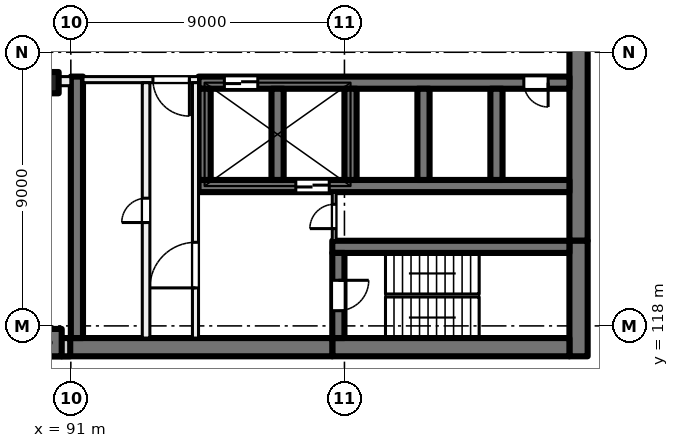
"""IFC4 building model, lengths in metres.
Left out: names, types, materials, properties, quantities, classifications, styles, units other than length and angle.
Written with IfcOpenShell. Run it as: python <this file> out.ifc"""

import sys

from ifc_helpers import new_model, si_unit, direction, frame, frame_2d, origin, origin_2d, place, context, subcontext, project, spatial, rectangle, extrude, element, fill, save


model = new_model("IFC4")
c1 = context("Model", 3, precision=1e-05, world=origin(), true_north=direction((0.0, 1.0)))
c2 = subcontext(c1, "Body", "Model", "MODEL_VIEW")
j1 = project(units=[si_unit("LENGTHUNIT", "METRE"), si_unit("PLANEANGLEUNIT", "RADIAN")], contexts=[c1])
p1 = place(None, origin())
s1 = spatial("IfcSite", under=j1, at=p1, CompositionType="ELEMENT")
p2 = place(p1, origin())
s2 = spatial("IfcBuilding", under=s1, at=p2, CompositionType="ELEMENT")
p3 = place(p2, frame((0.0, 0.0, 59.5)))
s3 = spatial("IfcBuildingStorey", under=s2, at=p3, CompositionType="ELEMENT", Elevation=59.5)
p4 = place(p3, frame((90.25, 126.0, 0.0), z_axis=(0.0, 0.0, 1.0), x_axis=(1.0, 0.0, 0.0)))
e1 = element("IfcColumn", 1, at=p4, inside=s3, PredefinedType="COLUMN", context=c2, shape_type="SweptSolid", body=[
    extrude(rectangle(XDim=0.7, YDim=0.7, at=origin_2d()), origin(), (0.0, 0.0, 1.0), 4.0),
])
p5 = place(p3, frame((90.25, 117.45, 0.0), z_axis=(0.0, 0.0, 1.0), x_axis=(1.0, 0.0, 0.0)))
e2 = element("IfcColumn", 2, at=p5, inside=s3, PredefinedType="COLUMN", context=c2, shape_type="SweptSolid", body=[
    extrude(rectangle(XDim=0.9, YDim=0.9, at=origin_2d()), origin(), (0.0, 0.0, 1.0), 4.0),
])
p6 = place(p3, frame((107.7, 135.2, 0.0), z_axis=(0.0, 0.0, 1.0), x_axis=(0.0, -1.0, 0.0)))
e3 = element("IfcWall", 3, at=p6, inside=s3, PredefinedType="SHEAR", context=c2, shape_type="SweptSolid", body=[
    extrude(rectangle(XDim=14.4, YDim=0.6, at=frame_2d((7.2, 0.0))), origin(), (0.0, 0.0, 1.0), 4.0),
])
p7 = place(p3, frame((107.7, 120.8, 0.0), z_axis=(0.0, 0.0, 1.0), x_axis=(0.0, -1.0, 0.0)))
e4 = element("IfcWall", 4, at=p7, inside=s3, PredefinedType="SHEAR", context=c2, shape_type="SweptSolid", body=[
    extrude(rectangle(XDim=3.8, YDim=0.6, at=frame_2d((1.9, 0.0))), origin(), (0.0, 0.0, 1.0), 4.0),
])
p8 = place(p3, frame((107.4, 117.3, 0.0), z_axis=(0.0, 0.0, 1.0), x_axis=(-1.0, 0.0, 0.0)))
e5 = element("IfcWall", 5, at=p8, inside=s3, PredefinedType="SHEAR", context=c2, shape_type="SweptSolid", body=[
    extrude(rectangle(XDim=7.8, YDim=0.6, at=frame_2d((3.9, 0.0))), origin(), (0.0, 0.0, 1.0), 4.0),
])
p9 = place(p3, frame((99.6, 117.3, 0.0), z_axis=(0.0, 0.0, 1.0), x_axis=(-1.0, 0.0, 0.0)))
e6 = element("IfcWall", 6, at=p9, inside=s3, PredefinedType="SHEAR", context=c2, shape_type="SweptSolid", body=[
    extrude(rectangle(XDim=8.9, YDim=0.6, at=frame_2d((4.45, 0.0))), origin(), (0.0, 0.0, 1.0), 4.0),
])
p10 = place(p3, frame((107.4, 120.6, 0.0), z_axis=(0.0, 0.0, 1.0), x_axis=(-1.0, 0.0, 0.0)))
e7 = element("IfcWall", 7, at=p10, inside=s3, PredefinedType="SHEAR", context=c2, shape_type="SweptSolid", body=[
    extrude(rectangle(XDim=7.8, YDim=0.4, at=frame_2d((3.9, 0.0))), origin(), (0.0, 0.0, 1.0), 4.0),
])
p11 = place(p3, frame((99.8, 120.4, 0.0), z_axis=(0.0, 0.0, 1.0), x_axis=(0.0, -1.0, 0.0)))
e8 = element("IfcWall", 8, at=p11, inside=s3, PredefinedType="SHEAR", context=c2, shape_type="SweptSolid", body=[
    extrude(rectangle(XDim=2.8, YDim=0.4, at=frame_2d((1.4, 0.0))), origin(), (0.0, 0.0, 1.0), 4.0),
])
p12 = place(p11, frame((0.9, 0.0, 0.0)))
e9 = element("IfcOpeningElement", 9, at=p12, cuts=e8, PredefinedType="OPENING", context=c2, shape_type="SweptSolid", body=[
    extrude(rectangle(XDim=1.0, YDim=2.1, at=frame_2d((0.5, 1.05))), frame((0.0, 0.21, 0.0), z_axis=(0.0, -1.0, 0.0), x_axis=(1.0, 0.0, 0.0)), (0.0, 0.0, 1.0), 0.42),
])
p13 = place(p3, frame((107.4, 126.0, 0.0), z_axis=(0.0, 0.0, 1.0), x_axis=(-1.0, 0.0, 0.0)))
e10 = element("IfcWall", 10, at=p13, inside=s3, PredefinedType="SHEAR", context=c2, shape_type="SweptSolid", body=[
    extrude(rectangle(XDim=12.2, YDim=0.4, at=frame_2d((6.1, 0.0))), origin(), (0.0, 0.0, 1.0), 4.0),
])
p14 = place(p13, frame((10.25, 0.0, 0.0)))
e11 = element("IfcOpeningElement", 11, at=p14, cuts=e10, PredefinedType="OPENING", context=c2, shape_type="SweptSolid", body=[
    extrude(rectangle(XDim=1.1, YDim=2.1, at=frame_2d((0.55, 1.05))), frame((0.0, 0.21, 0.0), z_axis=(0.0, -1.0, 0.0), x_axis=(1.0, 0.0, 0.0)), (0.0, 0.0, 1.0), 0.42),
])
p15 = place(p13, frame((0.7, 0.0, 0.0)))
e12 = element("IfcOpeningElement", 12, at=p15, cuts=e10, PredefinedType="OPENING", context=c2, shape_type="SweptSolid", body=[
    extrude(rectangle(XDim=0.8, YDim=2.1, at=frame_2d((0.4, 1.05))), frame((0.0, 0.21, 0.0), z_axis=(0.0, -1.0, 0.0), x_axis=(1.0, 0.0, 0.0)), (0.0, 0.0, 1.0), 0.42),
])
p16 = place(p3, frame((107.4, 122.6, 0.0), z_axis=(0.0, 0.0, 1.0), x_axis=(-1.0, 0.0, 0.0)))
e13 = element("IfcWall", 13, at=p16, inside=s3, PredefinedType="SHEAR", context=c2, shape_type="SweptSolid", body=[
    extrude(rectangle(XDim=12.2, YDim=0.4, at=frame_2d((6.1, 0.0))), origin(), (0.0, 0.0, 1.0), 4.0),
])
p17 = place(p16, frame((7.9, 0.0, 0.0)))
e14 = element("IfcOpeningElement", 14, at=p17, cuts=e13, PredefinedType="OPENING", context=c2, shape_type="SweptSolid", body=[
    extrude(rectangle(XDim=1.1, YDim=2.1, at=frame_2d((0.55, 1.05))), frame((0.0, 0.21, 0.0), z_axis=(0.0, -1.0, 0.0), x_axis=(1.0, 0.0, 0.0)), (0.0, 0.0, 1.0), 0.42),
])
for number, where, z_axis, x_axis in (
    (15, (105.0, 125.8, 0.0), (0.0, 0.0, 1.0), (0.0, -1.0, 0.0)),
    (16, (102.6, 125.8, 0.0), (0.0, 0.0, 1.0), (0.0, -1.0, 0.0)),
    (17, (100.2, 125.8, 0.0), (0.0, 0.0, 1.0), (0.0, -1.0, 0.0)),
    (18, (97.8, 125.8, 0.0), (0.0, 0.0, 1.0), (0.0, -1.0, 0.0)),
    (19, (95.4, 125.8, 0.0), (0.0, 0.0, 1.0), (0.0, -1.0, 0.0)),
):
    element("IfcWall", number, at=place(p3, frame(where, z_axis=z_axis, x_axis=x_axis)), inside=s3, PredefinedType="SHEAR", context=c2, shape_type="SweptSolid", body=[
        extrude(rectangle(XDim=3.0, YDim=0.4, at=frame_2d((1.5, 0.0))), origin(), (0.0, 0.0, 1.0), 4.0),
    ])
p18 = place(p3, frame((91.2, 126.2, 0.0), z_axis=(0.0, 0.0, 1.0), x_axis=(0.0, -1.0, 0.0)))
e20 = element("IfcWall", 20, at=p18, inside=s3, PredefinedType="SHEAR", context=c2, shape_type="SweptSolid", body=[
    extrude(rectangle(XDim=8.6, YDim=0.4, at=frame_2d((4.3, 0.0))), origin(), (0.0, 0.0, 1.0), 4.0),
])
p19 = place(p3, frame((90.98, 117.3, 0.0), z_axis=(0.0, 0.0, 1.0), x_axis=(-1.0, 0.0, 0.0)))
e21 = element("IfcWall", 21, at=p19, inside=s3, PredefinedType="SOLIDWALL", context=c2, shape_type="SweptSolid", body=[
    extrude(rectangle(XDim=33.745, YDim=0.6, at=frame_2d((16.873, 0.0))), origin(), (0.0, 0.0, 1.0), 3.625),
])
p20 = place(p19, frame((1.48, 0.0, 0.9)))
e22 = element("IfcOpeningElement", 22, at=p20, cuts=e21, PredefinedType="OPENING", context=c2, shape_type="SweptSolid", body=[
    extrude(rectangle(XDim=3.0, YDim=2.4, at=frame_2d((1.5, 1.2))), frame((0.0, 0.31, 0.0), z_axis=(0.0, -1.0, 0.0), x_axis=(1.0, 0.0, 0.0)), (0.0, 0.0, 1.0), 0.62),
])
p21 = place(p19, frame((5.98, 0.0, 0.9)))
e23 = element("IfcOpeningElement", 23, at=p21, cuts=e21, PredefinedType="OPENING", context=c2, shape_type="SweptSolid", body=[
    extrude(rectangle(XDim=3.0, YDim=2.4, at=frame_2d((1.5, 1.2))), frame((0.0, 0.31, 0.0), z_axis=(0.0, -1.0, 0.0), x_axis=(1.0, 0.0, 0.0)), (0.0, 0.0, 1.0), 0.62),
])
p22 = place(p19, frame((10.48, 0.0, 0.9)))
e24 = element("IfcOpeningElement", 24, at=p22, cuts=e21, PredefinedType="OPENING", context=c2, shape_type="SweptSolid", body=[
    extrude(rectangle(XDim=3.0, YDim=2.4, at=frame_2d((1.5, 1.2))), frame((0.0, 0.31, 0.0), z_axis=(0.0, -1.0, 0.0), x_axis=(1.0, 0.0, 0.0)), (0.0, 0.0, 1.0), 0.62),
])
p23 = place(p19, frame((14.98, 0.0, 0.9)))
e25 = element("IfcOpeningElement", 25, at=p23, cuts=e21, PredefinedType="OPENING", context=c2, shape_type="SweptSolid", body=[
    extrude(rectangle(XDim=3.0, YDim=2.4, at=frame_2d((1.5, 1.2))), frame((0.0, 0.31, 0.0), z_axis=(0.0, -1.0, 0.0), x_axis=(1.0, 0.0, 0.0)), (0.0, 0.0, 1.0), 0.62),
])
p24 = place(p19, frame((19.48, 0.0, 0.9)))
e26 = element("IfcOpeningElement", 26, at=p24, cuts=e21, PredefinedType="OPENING", context=c2, shape_type="SweptSolid", body=[
    extrude(rectangle(XDim=3.0, YDim=2.4, at=frame_2d((1.5, 1.2))), frame((0.0, 0.31, 0.0), z_axis=(0.0, -1.0, 0.0), x_axis=(1.0, 0.0, 0.0)), (0.0, 0.0, 1.0), 0.62),
])
p25 = place(p19, frame((23.98, 0.0, 0.9)))
e27 = element("IfcOpeningElement", 27, at=p25, cuts=e21, PredefinedType="OPENING", context=c2, shape_type="SweptSolid", body=[
    extrude(rectangle(XDim=3.0, YDim=2.4, at=frame_2d((1.5, 1.2))), frame((0.0, 0.31, 0.0), z_axis=(0.0, -1.0, 0.0), x_axis=(1.0, 0.0, 0.0)), (0.0, 0.0, 1.0), 0.62),
])
p26 = place(p19, frame((28.48, 0.0, 0.9)))
e28 = element("IfcOpeningElement", 28, at=p26, cuts=e21, PredefinedType="OPENING", context=c2, shape_type="SweptSolid", body=[
    extrude(rectangle(XDim=3.0, YDim=2.4, at=frame_2d((1.5, 1.2))), frame((0.0, 0.31, 0.0), z_axis=(0.0, -1.0, 0.0), x_axis=(1.0, 0.0, 0.0)), (0.0, 0.0, 1.0), 0.62),
])
p27 = place(p3, frame((95.2, 126.1, 0.0), z_axis=(0.0, 0.0, 1.0), x_axis=(-1.0, 0.0, 0.0)))
e29 = element("IfcWall", 29, at=p27, inside=s3, PredefinedType="PARTITIONING", context=c2, shape_type="SweptSolid", body=[
    extrude(rectangle(XDim=3.8, YDim=0.2, at=frame_2d((1.9, 0.0))), origin(), (0.0, 0.0, 1.0), 3.625),
])
p28 = place(p27, frame((0.3, 0.0, 0.0)))
e30 = element("IfcOpeningElement", 30, at=p28, cuts=e29, PredefinedType="OPENING", context=c2, shape_type="SweptSolid", body=[
    extrude(rectangle(XDim=1.2, YDim=2.1, at=frame_2d((0.6, 1.05))), frame((0.0, 0.11, 0.0), z_axis=(0.0, -1.0, 0.0), x_axis=(1.0, 0.0, 0.0)), (0.0, 0.0, 1.0), 0.22),
])
p29 = place(p3, frame((95.1, 117.6, 0.0), z_axis=(0.0, 0.0, 1.0), x_axis=(0.0, 1.0, 0.0)))
e31 = element("IfcWall", 31, at=p29, inside=s3, PredefinedType="PARTITIONING", context=c2, shape_type="SweptSolid", body=[
    extrude(rectangle(XDim=8.4, YDim=0.2, at=frame_2d((4.2, 0.0))), origin(), (0.0, 0.0, 1.0), 3.625),
])
p30 = place(p29, frame((1.65, 0.0, 0.0)))
e32 = element("IfcOpeningElement", 32, at=p30, cuts=e31, PredefinedType="OPENING", context=c2, shape_type="SweptSolid", body=[
    extrude(rectangle(XDim=1.5, YDim=2.1, at=frame_2d((0.75, 1.05))), frame((0.0, 0.11, 0.0), z_axis=(0.0, -1.0, 0.0), x_axis=(1.0, 0.0, 0.0)), (0.0, 0.0, 1.0), 0.22),
])
p31 = place(p3, frame((93.475, 117.6, 0.0), z_axis=(0.0, 0.0, 1.0), x_axis=(0.0, 1.0, 0.0)))
e33 = element("IfcWall", 33, at=p31, inside=s3, PredefinedType="PARTITIONING", context=c2, shape_type="SweptSolid", body=[
    extrude(rectangle(XDim=8.4, YDim=0.25, at=frame_2d((4.2, 0.0))), origin(), (0.0, 0.0, 1.0), 3.625),
])
p32 = place(p31, frame((3.8, 0.0, 0.0)))
e34 = element("IfcOpeningElement", 34, at=p32, cuts=e33, PredefinedType="OPENING", context=c2, shape_type="SweptSolid", body=[
    extrude(rectangle(XDim=0.8, YDim=2.1, at=frame_2d((0.4, 1.05))), frame((0.0, 0.135, 0.0), z_axis=(0.0, -1.0, 0.0), x_axis=(1.0, 0.0, 0.0)), (0.0, 0.0, 1.0), 0.27),
])
p33 = place(p3, frame((99.663, 120.8, 0.0), z_axis=(0.0, 0.0, 1.0), x_axis=(0.0, 1.0, 0.0)))
e35 = element("IfcWall", 35, at=p33, inside=s3, PredefinedType="PARTITIONING", context=c2, shape_type="SweptSolid", body=[
    extrude(rectangle(XDim=1.6, YDim=0.125, at=frame_2d((0.8, 0.0))), origin(), (0.0, 0.0, 1.0), 3.625),
])
p34 = place(p33, frame((0.4, 0.0, 0.0)))
e36 = element("IfcOpeningElement", 36, at=p34, cuts=e35, PredefinedType="OPENING", context=c2, shape_type="SweptSolid", body=[
    extrude(rectangle(XDim=0.8, YDim=2.1, at=frame_2d((0.4, 1.05))), frame((0.0, 0.073, 0.0), z_axis=(0.0, -1.0, 0.0), x_axis=(1.0, 0.0, 0.0)), (0.0, 0.0, 1.0), 0.145),
])
p35 = place(p3, frame((91.0, 126.05, 0.0), z_axis=(0.0, 0.0, 1.0), x_axis=(-1.0, 0.0, 0.0)))
e37 = element("IfcWall", 37, at=p35, inside=s3, PredefinedType="PARTITIONING", context=c2, shape_type="SweptSolid", body=[
    extrude(rectangle(XDim=43.785, YDim=0.3, at=frame_2d((21.893, 0.0))), origin(), (0.0, 0.0, 1.0), 3.625),
])
p36 = place(p35, frame((2.125, 0.0, 0.0)))
e38 = element("IfcOpeningElement", 38, at=p36, cuts=e37, PredefinedType="OPENING", context=c2, shape_type="SweptSolid", body=[
    extrude(rectangle(XDim=1.0, YDim=2.1, at=frame_2d((0.5, 1.05))), frame((0.0, 0.16, 0.0), z_axis=(0.0, -1.0, 0.0), x_axis=(1.0, 0.0, 0.0)), (0.0, 0.0, 1.0), 0.32),
])
p37 = place(p35, frame((7.0, 0.0, 0.0)))
e39 = element("IfcOpeningElement", 39, at=p37, cuts=e37, PredefinedType="OPENING", context=c2, shape_type="SweptSolid", body=[
    extrude(rectangle(XDim=1.0, YDim=2.1, at=frame_2d((0.5, 1.05))), frame((0.0, 0.16, 0.0), z_axis=(0.0, -1.0, 0.0), x_axis=(1.0, 0.0, 0.0)), (0.0, 0.0, 1.0), 0.32),
])
p38 = place(p35, frame((11.5, 0.0, 0.0)))
e40 = element("IfcOpeningElement", 40, at=p38, cuts=e37, PredefinedType="OPENING", context=c2, shape_type="SweptSolid", body=[
    extrude(rectangle(XDim=1.0, YDim=2.1, at=frame_2d((0.5, 1.05))), frame((0.0, 0.16, 0.0), z_axis=(0.0, -1.0, 0.0), x_axis=(1.0, 0.0, 0.0)), (0.0, 0.0, 1.0), 0.32),
])
p39 = place(p35, frame((15.9, 0.0, 0.0)))
e41 = element("IfcOpeningElement", 41, at=p39, cuts=e37, PredefinedType="OPENING", context=c2, shape_type="SweptSolid", body=[
    extrude(rectangle(XDim=1.2, YDim=2.1, at=frame_2d((0.6, 1.05))), frame((0.0, 0.16, 0.0), z_axis=(0.0, -1.0, 0.0), x_axis=(1.0, 0.0, 0.0)), (0.0, 0.0, 1.0), 0.32),
])
p40 = place(p35, frame((22.35, 0.0, 0.0)))
e42 = element("IfcOpeningElement", 42, at=p40, cuts=e37, PredefinedType="OPENING", context=c2, shape_type="SweptSolid", body=[
    extrude(rectangle(XDim=1.8, YDim=2.1, at=frame_2d((0.9, 1.05))), frame((0.0, 0.16, 0.0), z_axis=(0.0, -1.0, 0.0), x_axis=(1.0, 0.0, 0.0)), (0.0, 0.0, 1.0), 0.32),
])
p41 = place(p35, frame((34.0, 0.0, 0.0)))
e43 = element("IfcOpeningElement", 43, at=p41, cuts=e37, PredefinedType="OPENING", context=c2, shape_type="SweptSolid", body=[
    extrude(rectangle(XDim=1.0, YDim=2.1, at=frame_2d((0.5, 1.05))), frame((0.0, 0.16, 0.0), z_axis=(0.0, -1.0, 0.0), x_axis=(1.0, 0.0, 0.0)), (0.0, 0.0, 1.0), 0.32),
])
p42 = place(p35, frame((39.296, 0.0, 0.0)))
e44 = element("IfcOpeningElement", 44, at=p42, cuts=e37, PredefinedType="OPENING", context=c2, shape_type="SweptSolid", body=[
    extrude(rectangle(XDim=1.8, YDim=2.1, at=frame_2d((0.9, 1.05))), frame((0.0, 0.16, 0.0), z_axis=(0.0, -1.0, 0.0), x_axis=(1.0, 0.0, 0.0)), (0.0, 0.0, 1.0), 0.32),
])
p43 = place(p14, origin())
e45 = element("IfcDoor", 45, at=p43, inside=s3, OperationType="DOUBLE_DOOR_SLIDING", PredefinedType="DOOR", context=c2, shape_type="SweptSolid", body=[
    extrude(rectangle(XDim=1.1, YDim=2.1, at=frame_2d((0.55, 1.05))), frame((0.0, 0.025, 0.0), z_axis=(0.0, -1.0, 0.0), x_axis=(1.0, 0.0, 0.0)), (0.0, 0.0, 1.0), 0.05),
])
fill(e11, e45)
p44 = place(p15, origin())
e46 = element("IfcDoor", 46, at=p44, inside=s3, OperationType="SINGLE_SWING_LEFT", PredefinedType="DOOR", context=c2, shape_type="SweptSolid", body=[
    extrude(rectangle(XDim=0.8, YDim=2.1, at=frame_2d((0.4, 1.05))), frame((0.0, 0.025, 0.0), z_axis=(0.0, -1.0, 0.0), x_axis=(1.0, 0.0, 0.0)), (0.0, 0.0, 1.0), 0.05),
])
fill(e12, e46)
p45 = place(p28, origin())
e47 = element("IfcDoor", 47, at=p45, inside=s3, OperationType="DOUBLE_DOOR_SINGLE_SWING", PredefinedType="DOOR", context=c2, shape_type="SweptSolid", body=[
    extrude(rectangle(XDim=1.2, YDim=2.1, at=frame_2d((0.6, 1.05))), frame((0.0, 0.025, 0.0), z_axis=(0.0, -1.0, 0.0), x_axis=(1.0, 0.0, 0.0)), (0.0, 0.0, 1.0), 0.05),
])
fill(e30, e47)
p46 = place(p30, origin())
e48 = element("IfcDoor", 48, at=p46, inside=s3, OperationType="DOUBLE_DOOR_SINGLE_SWING", PredefinedType="DOOR", context=c2, shape_type="SweptSolid", body=[
    extrude(rectangle(XDim=1.5, YDim=2.1, at=frame_2d((0.75, 1.05))), frame((0.0, 0.025, 0.0), z_axis=(0.0, -1.0, 0.0), x_axis=(1.0, 0.0, 0.0)), (0.0, 0.0, 1.0), 0.05),
])
fill(e32, e48)
p47 = place(p12, origin())
e49 = element("IfcDoor", 49, at=p47, inside=s3, OperationType="SINGLE_SWING_LEFT", PredefinedType="DOOR", context=c2, shape_type="SweptSolid", body=[
    extrude(rectangle(XDim=1.0, YDim=2.1, at=frame_2d((0.5, 1.05))), frame((0.0, 0.025, 0.0), z_axis=(0.0, -1.0, 0.0), x_axis=(1.0, 0.0, 0.0)), (0.0, 0.0, 1.0), 0.05),
])
fill(e9, e49)
p48 = place(p34, origin())
e50 = element("IfcDoor", 50, at=p48, inside=s3, OperationType="SINGLE_SWING_RIGHT", PredefinedType="DOOR", context=c2, shape_type="SweptSolid", body=[
    extrude(rectangle(XDim=0.8, YDim=2.1, at=frame_2d((0.4, 1.05))), frame((0.0, 0.025, 0.0), z_axis=(0.0, -1.0, 0.0), x_axis=(1.0, 0.0, 0.0)), (0.0, 0.0, 1.0), 0.05),
])
fill(e36, e50)
p49 = place(p32, origin())
e51 = element("IfcDoor", 51, at=p49, inside=s3, OperationType="SINGLE_SWING_LEFT", PredefinedType="DOOR", context=c2, shape_type="SweptSolid", body=[
    extrude(rectangle(XDim=0.8, YDim=2.1, at=frame_2d((0.4, 1.05))), frame((0.0, 0.025, 0.0), z_axis=(0.0, -1.0, 0.0), x_axis=(1.0, 0.0, 0.0)), (0.0, 0.0, 1.0), 0.05),
])
fill(e34, e51)
p50 = place(p17, origin())
e52 = element("IfcDoor", 52, at=p50, inside=s3, OperationType="DOUBLE_DOOR_SLIDING", PredefinedType="DOOR", context=c2, shape_type="SweptSolid", body=[
    extrude(rectangle(XDim=1.1, YDim=2.1, at=frame_2d((0.55, 1.05))), frame((0.0, 0.025, 0.0), z_axis=(0.0, -1.0, 0.0), x_axis=(1.0, 0.0, 0.0)), (0.0, 0.0, 1.0), 0.05),
])
fill(e14, e52)
save(model, sys.argv[1])
